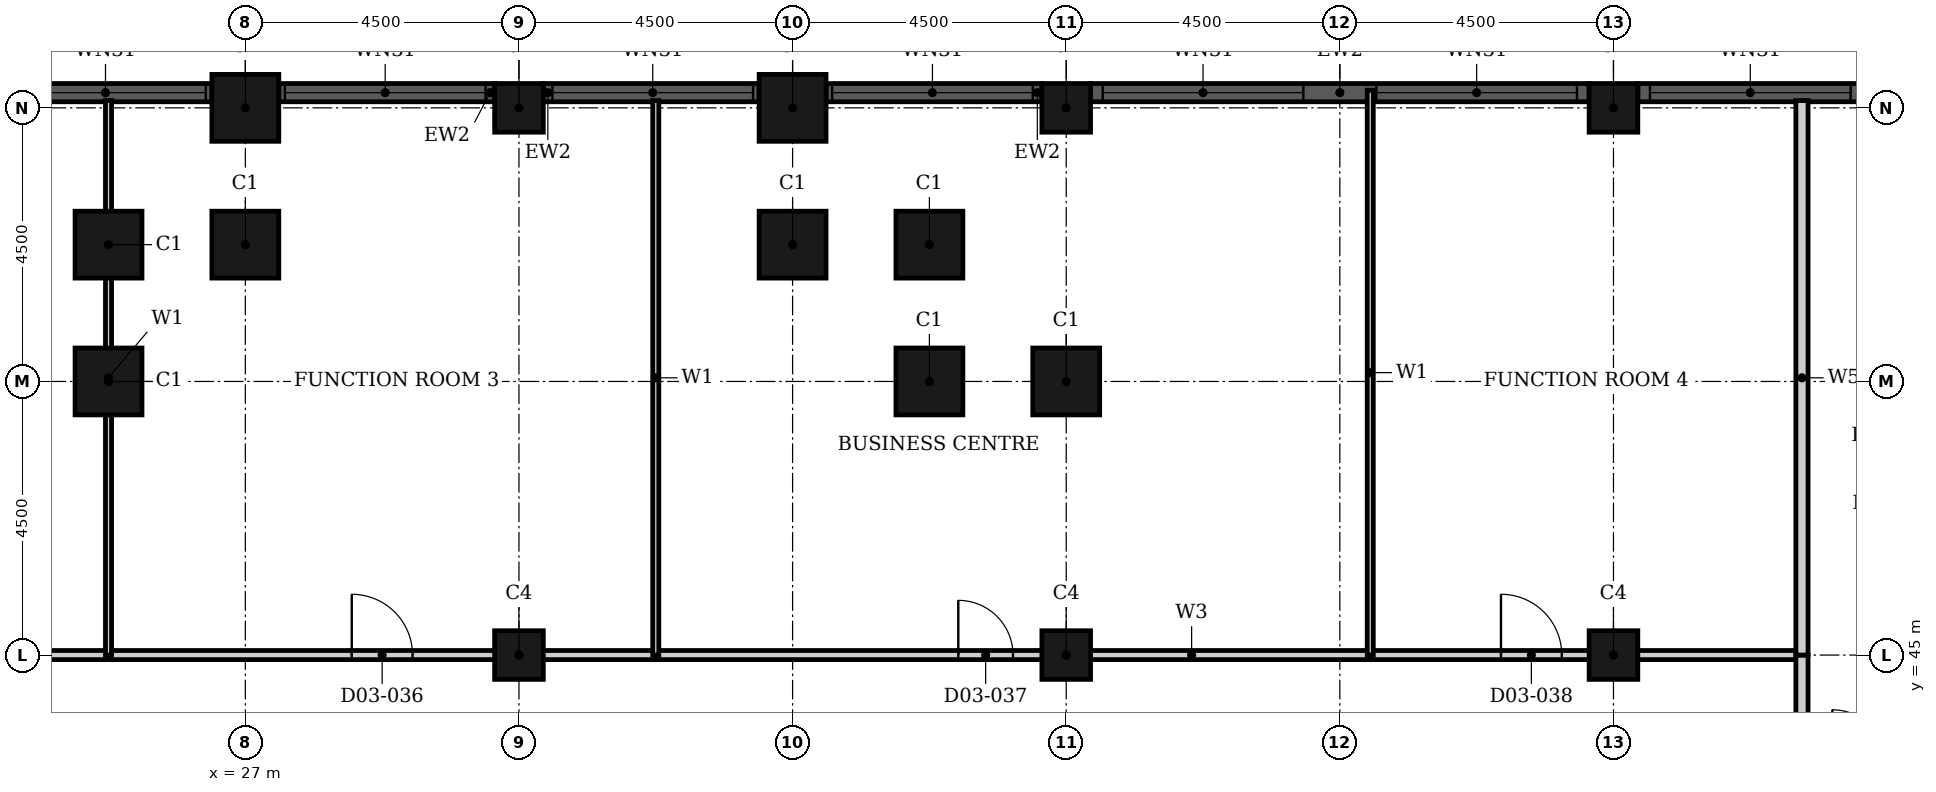
"""IFC4 building model, lengths in metres.
Left out: names, types, materials, properties, quantities, classifications, styles, units other than length and angle.
Written with IfcOpenShell. Run it as: python <this file> out.ifc"""

import sys

from ifc_helpers import new_model, si_unit, direction, frame, frame_2d, origin, origin_2d, place, context, subcontext, project, spatial, rectangle, hollow_rectangle, extrude, element, fill, save


model = new_model("IFC4")
c1 = context("Model", 3, precision=1e-05, world=origin(), true_north=direction((0.0, 1.0)))
c2 = subcontext(c1, "Body", "Model", "MODEL_VIEW")
j1 = project(units=[si_unit("LENGTHUNIT", "METRE"), si_unit("PLANEANGLEUNIT", "RADIAN")], contexts=[c1])
p1 = place(None, origin())
s1 = spatial("IfcSite", under=j1, at=p1, CompositionType="ELEMENT")
p2 = place(p1, origin())
s2 = spatial("IfcBuilding", under=s1, at=p2, CompositionType="ELEMENT")
p3 = place(p2, frame((0.0, 0.0, 17.4)))
s3 = spatial("IfcBuildingStorey", under=s2, at=p3, CompositionType="ELEMENT", Elevation=17.4)
for number, where, z_axis, x_axis in (
    (1, (40.5, 49.5, 0.0), (0.0, 0.0, 1.0), (1.0, 0.0, 0.0)),
    (2, (38.25, 49.5, 0.0), (0.0, 0.0, 1.0), (1.0, 0.0, 0.0)),
    (3, (38.25, 51.75, 0.0), (0.0, 0.0, 1.0), (1.0, 0.0, 0.0)),
    (4, (36.0, 51.75, 0.0), (0.0, 0.0, 1.0), (1.0, 0.0, 0.0)),
    (5, (36.0, 54.0, 0.0), (0.0, 0.0, 1.0), (1.0, 0.0, 0.0)),
    (6, (27.0, 54.0, 0.0), (0.0, 0.0, 1.0), (1.0, 0.0, 0.0)),
    (7, (27.0, 51.75, 0.0), (0.0, 0.0, 1.0), (1.0, 0.0, 0.0)),
    (8, (24.75, 51.75, 0.0), (0.0, 0.0, 1.0), (1.0, 0.0, 0.0)),
    (9, (24.75, 49.5, 0.0), (0.0, 0.0, 1.0), (1.0, 0.0, 0.0)),
):
    element("IfcColumn", number, at=place(p3, frame(where, z_axis=z_axis, x_axis=x_axis)), inside=s3, PredefinedType="COLUMN", context=c2, shape_type="SweptSolid", body=[
        extrude(hollow_rectangle(XDim=1.1, YDim=1.1, WallThickness=0.036, at=origin_2d()), origin(), (0.0, 0.0, 1.0), 6.6),
    ])
for number, where, z_axis, x_axis in (
    (10, (31.5, 54.0, 0.0), (0.0, 0.0, 1.0), (1.0, 0.0, 0.0)),
    (11, (40.5, 54.0, 0.0), (0.0, 0.0, 1.0), (1.0, 0.0, 0.0)),
    (12, (49.5, 54.0, 0.0), (0.0, 0.0, 1.0), (1.0, 0.0, 0.0)),
    (13, (31.5, 45.0, 0.0), (0.0, 0.0, 1.0), (1.0, 0.0, 0.0)),
    (14, (40.5, 45.0, 0.0), (0.0, 0.0, 1.0), (1.0, 0.0, 0.0)),
    (15, (49.5, 45.0, 0.0), (0.0, 0.0, 1.0), (1.0, 0.0, 0.0)),
):
    element("IfcColumn", number, at=place(p3, frame(where, z_axis=z_axis, x_axis=x_axis)), inside=s3, PredefinedType="COLUMN", context=c2, shape_type="SweptSolid", body=[
        extrude(hollow_rectangle(XDim=0.8, YDim=0.8, WallThickness=0.025, at=origin_2d()), origin(), (0.0, 0.0, 1.0), 6.6),
    ])
p4 = place(p3, frame((58.1, 54.25, 0.0), z_axis=(0.0, 0.0, 1.0), x_axis=(-1.0, 0.0, 0.0)))
e16 = element("IfcWall", 16, at=p4, inside=s3, PredefinedType="SOLIDWALL", context=c2, shape_type="SweptSolid", body=[
    extrude(rectangle(XDim=8.2, YDim=0.3, at=frame_2d((4.1, 0.0))), origin(), (0.0, 0.0, 1.0), 6.6),
])
p5 = place(p4, frame((0.2, 0.0, 0.9)))
e17 = element("IfcOpeningElement", 17, at=p5, cuts=e16, PredefinedType="OPENING", context=c2, shape_type="SweptSolid", body=[
    extrude(rectangle(XDim=3.3, YDim=3.6, at=frame_2d((1.65, 1.8))), frame((0.0, 0.16, 0.0), z_axis=(0.0, -1.0, 0.0), x_axis=(1.0, 0.0, 0.0)), (0.0, 0.0, 1.0), 0.32),
])
p6 = place(p4, frame((4.7, 0.0, 0.9)))
e18 = element("IfcOpeningElement", 18, at=p6, cuts=e16, PredefinedType="OPENING", context=c2, shape_type="SweptSolid", body=[
    extrude(rectangle(XDim=3.3, YDim=3.6, at=frame_2d((1.65, 1.8))), frame((0.0, 0.16, 0.0), z_axis=(0.0, -1.0, 0.0), x_axis=(1.0, 0.0, 0.0)), (0.0, 0.0, 1.0), 0.32),
])
p7 = place(p3, frame((49.1, 54.25, 0.0), z_axis=(0.0, 0.0, 1.0), x_axis=(-1.0, 0.0, 0.0)))
e19 = element("IfcWall", 19, at=p7, inside=s3, PredefinedType="SOLIDWALL", context=c2, shape_type="SweptSolid", body=[
    extrude(rectangle(XDim=8.2, YDim=0.3, at=frame_2d((4.1, 0.0))), origin(), (0.0, 0.0, 1.0), 6.6),
])
p8 = place(p7, frame((0.2, 0.0, 0.9)))
e20 = element("IfcOpeningElement", 20, at=p8, cuts=e19, PredefinedType="OPENING", context=c2, shape_type="SweptSolid", body=[
    extrude(rectangle(XDim=3.3, YDim=3.6, at=frame_2d((1.65, 1.8))), frame((0.0, 0.16, 0.0), z_axis=(0.0, -1.0, 0.0), x_axis=(1.0, 0.0, 0.0)), (0.0, 0.0, 1.0), 0.32),
])
p9 = place(p7, frame((4.7, 0.0, 0.9)))
e21 = element("IfcOpeningElement", 21, at=p9, cuts=e19, PredefinedType="OPENING", context=c2, shape_type="SweptSolid", body=[
    extrude(rectangle(XDim=3.3, YDim=3.6, at=frame_2d((1.65, 1.8))), frame((0.0, 0.16, 0.0), z_axis=(0.0, -1.0, 0.0), x_axis=(1.0, 0.0, 0.0)), (0.0, 0.0, 1.0), 0.32),
])
p10 = place(p3, frame((40.1, 54.25, 0.0), z_axis=(0.0, 0.0, 1.0), x_axis=(-1.0, 0.0, 0.0)))
e22 = element("IfcWall", 22, at=p10, inside=s3, PredefinedType="SOLIDWALL", context=c2, shape_type="SweptSolid", body=[
    extrude(rectangle(XDim=3.55, YDim=0.3, at=frame_2d((1.775, 0.0))), origin(), (0.0, 0.0, 1.0), 6.6),
])
p11 = place(p10, frame((0.15, 0.0, 0.9)))
e23 = element("IfcOpeningElement", 23, at=p11, cuts=e22, PredefinedType="OPENING", context=c2, shape_type="SweptSolid", body=[
    extrude(rectangle(XDim=3.3, YDim=3.6, at=frame_2d((1.65, 1.8))), frame((0.0, 0.16, 0.0), z_axis=(0.0, -1.0, 0.0), x_axis=(1.0, 0.0, 0.0)), (0.0, 0.0, 1.0), 0.32),
])
p12 = place(p3, frame((35.45, 54.25, 0.0), z_axis=(0.0, 0.0, 1.0), x_axis=(-1.0, 0.0, 0.0)))
e24 = element("IfcWall", 24, at=p12, inside=s3, PredefinedType="SOLIDWALL", context=c2, shape_type="SweptSolid", body=[
    extrude(rectangle(XDim=3.55, YDim=0.3, at=frame_2d((1.775, 0.0))), origin(), (0.0, 0.0, 1.0), 6.6),
])
p13 = place(p12, frame((0.1, 0.0, 0.9)))
e25 = element("IfcOpeningElement", 25, at=p13, cuts=e24, PredefinedType="OPENING", context=c2, shape_type="SweptSolid", body=[
    extrude(rectangle(XDim=3.3, YDim=3.6, at=frame_2d((1.65, 1.8))), frame((0.0, 0.16, 0.0), z_axis=(0.0, -1.0, 0.0), x_axis=(1.0, 0.0, 0.0)), (0.0, 0.0, 1.0), 0.32),
])
p14 = place(p3, frame((31.1, 54.25, 0.0), z_axis=(0.0, 0.0, 1.0), x_axis=(-1.0, 0.0, 0.0)))
e26 = element("IfcWall", 26, at=p14, inside=s3, PredefinedType="SOLIDWALL", context=c2, shape_type="SweptSolid", body=[
    extrude(rectangle(XDim=3.55, YDim=0.3, at=frame_2d((1.775, 0.0))), origin(), (0.0, 0.0, 1.0), 6.6),
])
p15 = place(p14, frame((0.15, 0.0, 0.9)))
e27 = element("IfcOpeningElement", 27, at=p15, cuts=e26, PredefinedType="OPENING", context=c2, shape_type="SweptSolid", body=[
    extrude(rectangle(XDim=3.3, YDim=3.6, at=frame_2d((1.65, 1.8))), frame((0.0, 0.16, 0.0), z_axis=(0.0, -1.0, 0.0), x_axis=(1.0, 0.0, 0.0)), (0.0, 0.0, 1.0), 0.32),
])
p16 = place(p3, frame((26.45, 54.25, 0.0), z_axis=(0.0, 0.0, 1.0), x_axis=(-1.0, 0.0, 0.0)))
e28 = element("IfcWall", 28, at=p16, inside=s3, PredefinedType="SOLIDWALL", context=c2, shape_type="SweptSolid", body=[
    extrude(rectangle(XDim=3.55, YDim=0.3, at=frame_2d((1.775, 0.0))), origin(), (0.0, 0.0, 1.0), 6.6),
])
p17 = place(p16, frame((0.1, 0.0, 0.9)))
e29 = element("IfcOpeningElement", 29, at=p17, cuts=e28, PredefinedType="OPENING", context=c2, shape_type="SweptSolid", body=[
    extrude(rectangle(XDim=3.3, YDim=3.6, at=frame_2d((1.65, 1.8))), frame((0.0, 0.16, 0.0), z_axis=(0.0, -1.0, 0.0), x_axis=(1.0, 0.0, 0.0)), (0.0, 0.0, 1.0), 0.32),
])
p18 = place(p3, frame((15.75, 45.0, 0.0), z_axis=(0.0, 0.0, 1.0), x_axis=(1.0, 0.0, 0.0)))
e30 = element("IfcWall", 30, at=p18, inside=s3, PredefinedType="PARTITIONING", context=c2, shape_type="SweptSolid", body=[
    extrude(rectangle(XDim=9.0, YDim=0.15, at=frame_2d((4.5, 0.0))), origin(), (0.0, 0.0, 1.0), 6.25),
])
p19 = place(p18, frame((4.0, 0.0, 0.0)))
e31 = element("IfcOpeningElement", 31, at=p19, cuts=e30, PredefinedType="OPENING", context=c2, shape_type="SweptSolid", body=[
    extrude(rectangle(XDim=1.0, YDim=2.1, at=frame_2d((0.5, 1.05))), frame((0.0, 0.085, 0.0), z_axis=(0.0, -1.0, 0.0), x_axis=(1.0, 0.0, 0.0)), (0.0, 0.0, 1.0), 0.17),
])
p20 = place(p3, frame((24.75, 45.0, 0.0), z_axis=(0.0, 0.0, 1.0), x_axis=(1.0, 0.0, 0.0)))
e32 = element("IfcWall", 32, at=p20, inside=s3, PredefinedType="PARTITIONING", context=c2, shape_type="SweptSolid", body=[
    extrude(rectangle(XDim=9.0, YDim=0.15, at=frame_2d((4.5, 0.0))), origin(), (0.0, 0.0, 1.0), 6.25),
])
p21 = place(p20, frame((4.0, 0.0, 0.0)))
e33 = element("IfcOpeningElement", 33, at=p21, cuts=e32, PredefinedType="OPENING", context=c2, shape_type="SweptSolid", body=[
    extrude(rectangle(XDim=1.0, YDim=2.1, at=frame_2d((0.5, 1.05))), frame((0.0, 0.085, 0.0), z_axis=(0.0, -1.0, 0.0), x_axis=(1.0, 0.0, 0.0)), (0.0, 0.0, 1.0), 0.17),
])
p22 = place(p3, frame((33.75, 45.0, 0.0), z_axis=(0.0, 0.0, 1.0), x_axis=(1.0, 0.0, 0.0)))
e34 = element("IfcWall", 34, at=p22, inside=s3, PredefinedType="PARTITIONING", context=c2, shape_type="SweptSolid", body=[
    extrude(rectangle(XDim=11.75, YDim=0.15, at=frame_2d((5.875, 0.0))), origin(), (0.0, 0.0, 1.0), 6.25),
])
p23 = place(p22, frame((4.975, 0.0, 0.0)))
e35 = element("IfcOpeningElement", 35, at=p23, cuts=e34, PredefinedType="OPENING", context=c2, shape_type="SweptSolid", body=[
    extrude(rectangle(XDim=0.9, YDim=2.1, at=frame_2d((0.45, 1.05))), frame((0.0, 0.085, 0.0), z_axis=(0.0, -1.0, 0.0), x_axis=(1.0, 0.0, 0.0)), (0.0, 0.0, 1.0), 0.17),
])
p24 = place(p3, frame((45.5, 45.0, 0.0), z_axis=(0.0, 0.0, 1.0), x_axis=(1.0, 0.0, 0.0)))
e36 = element("IfcWall", 36, at=p24, inside=s3, PredefinedType="PARTITIONING", context=c2, shape_type="SweptSolid", body=[
    extrude(rectangle(XDim=7.1, YDim=0.15, at=frame_2d((3.55, 0.0))), origin(), (0.0, 0.0, 1.0), 6.25),
])
p25 = place(p24, frame((2.15, 0.0, 0.0)))
e37 = element("IfcOpeningElement", 37, at=p25, cuts=e36, PredefinedType="OPENING", context=c2, shape_type="SweptSolid", body=[
    extrude(rectangle(XDim=1.0, YDim=2.1, at=frame_2d((0.5, 1.05))), frame((0.0, 0.085, 0.0), z_axis=(0.0, -1.0, 0.0), x_axis=(1.0, 0.0, 0.0)), (0.0, 0.0, 1.0), 0.17),
])
for number, where, z_axis, x_axis in (
    (38, (24.75, 45.0, 0.0), (0.0, 0.0, 1.0), (0.0, 1.0, 0.0)),
    (39, (33.75, 45.0, 0.0), (0.0, 0.0, 1.0), (0.0, 1.0, 0.0)),
):
    element("IfcWall", number, at=place(p3, frame(where, z_axis=z_axis, x_axis=x_axis)), inside=s3, PredefinedType="PARTITIONING", context=c2, shape_type="SweptSolid", body=[
        extrude(rectangle(XDim=9.12, YDim=0.1, at=frame_2d((4.56, 0.0))), origin(), (0.0, 0.0, 1.0), 6.25),
    ])
p26 = place(p3, frame((45.5, 45.0, 0.0), z_axis=(0.0, 0.0, 1.0), x_axis=(0.0, 1.0, 0.0)))
e40 = element("IfcWall", 40, at=p26, inside=s3, PredefinedType="PARTITIONING", context=c2, shape_type="SweptSolid", body=[
    extrude(rectangle(XDim=9.29, YDim=0.1, at=frame_2d((4.645, 0.0))), origin(), (0.0, 0.0, 1.0), 6.25),
])
p27 = place(p3, frame((52.6, 43.2, 0.0), z_axis=(0.0, 0.0, 1.0), x_axis=(0.0, 1.0, 0.0)))
e41 = element("IfcWall", 41, at=p27, inside=s3, PredefinedType="PARTITIONING", context=c2, shape_type="SweptSolid", body=[
    extrude(rectangle(XDim=1.8, YDim=0.2, at=frame_2d((0.9, 0.0))), origin(), (0.0, 0.0, 1.0), 6.25),
])
p28 = place(p3, frame((52.6, 45.0, 0.0), z_axis=(0.0, 0.0, 1.0), x_axis=(0.0, 1.0, 0.0)))
e42 = element("IfcWall", 42, at=p28, inside=s3, PredefinedType="PARTITIONING", context=c2, shape_type="SweptSolid", body=[
    extrude(rectangle(XDim=9.12, YDim=0.2, at=frame_2d((4.56, 0.0))), origin(), (0.0, 0.0, 1.0), 6.25),
])
p29 = place(p6, origin())
e43 = element("IfcWindow", 43, at=p29, inside=s3, PartitioningType="SINGLE_PANEL", PredefinedType="WINDOW", context=c2, shape_type="SweptSolid", body=[
    extrude(rectangle(XDim=3.3, YDim=3.6, at=frame_2d((1.65, 1.8))), frame((0.0, 0.03, 0.0), z_axis=(0.0, -1.0, 0.0), x_axis=(1.0, 0.0, 0.0)), (0.0, 0.0, 1.0), 0.06),
])
fill(e18, e43)
p30 = place(p8, origin())
e44 = element("IfcWindow", 44, at=p30, inside=s3, PartitioningType="SINGLE_PANEL", PredefinedType="WINDOW", context=c2, shape_type="SweptSolid", body=[
    extrude(rectangle(XDim=3.3, YDim=3.6, at=frame_2d((1.65, 1.8))), frame((0.0, 0.03, 0.0), z_axis=(0.0, -1.0, 0.0), x_axis=(1.0, 0.0, 0.0)), (0.0, 0.0, 1.0), 0.06),
])
fill(e20, e44)
p31 = place(p9, origin())
e45 = element("IfcWindow", 45, at=p31, inside=s3, PartitioningType="SINGLE_PANEL", PredefinedType="WINDOW", context=c2, shape_type="SweptSolid", body=[
    extrude(rectangle(XDim=3.3, YDim=3.6, at=frame_2d((1.65, 1.8))), frame((0.0, 0.03, 0.0), z_axis=(0.0, -1.0, 0.0), x_axis=(1.0, 0.0, 0.0)), (0.0, 0.0, 1.0), 0.06),
])
fill(e21, e45)
p32 = place(p11, origin())
e46 = element("IfcWindow", 46, at=p32, inside=s3, PartitioningType="SINGLE_PANEL", PredefinedType="WINDOW", context=c2, shape_type="SweptSolid", body=[
    extrude(rectangle(XDim=3.3, YDim=3.6, at=frame_2d((1.65, 1.8))), frame((0.0, 0.03, 0.0), z_axis=(0.0, -1.0, 0.0), x_axis=(1.0, 0.0, 0.0)), (0.0, 0.0, 1.0), 0.06),
])
fill(e23, e46)
p33 = place(p13, origin())
e47 = element("IfcWindow", 47, at=p33, inside=s3, PartitioningType="SINGLE_PANEL", PredefinedType="WINDOW", context=c2, shape_type="SweptSolid", body=[
    extrude(rectangle(XDim=3.3, YDim=3.6, at=frame_2d((1.65, 1.8))), frame((0.0, 0.03, 0.0), z_axis=(0.0, -1.0, 0.0), x_axis=(1.0, 0.0, 0.0)), (0.0, 0.0, 1.0), 0.06),
])
fill(e25, e47)
p34 = place(p15, origin())
e48 = element("IfcWindow", 48, at=p34, inside=s3, PartitioningType="SINGLE_PANEL", PredefinedType="WINDOW", context=c2, shape_type="SweptSolid", body=[
    extrude(rectangle(XDim=3.3, YDim=3.6, at=frame_2d((1.65, 1.8))), frame((0.0, 0.03, 0.0), z_axis=(0.0, -1.0, 0.0), x_axis=(1.0, 0.0, 0.0)), (0.0, 0.0, 1.0), 0.06),
])
fill(e27, e48)
p35 = place(p17, origin())
e49 = element("IfcWindow", 49, at=p35, inside=s3, PartitioningType="SINGLE_PANEL", PredefinedType="WINDOW", context=c2, shape_type="SweptSolid", body=[
    extrude(rectangle(XDim=3.3, YDim=3.6, at=frame_2d((1.65, 1.8))), frame((0.0, 0.03, 0.0), z_axis=(0.0, -1.0, 0.0), x_axis=(1.0, 0.0, 0.0)), (0.0, 0.0, 1.0), 0.06),
])
fill(e29, e49)
p36 = place(p21, origin())
e50 = element("IfcDoor", 50, at=p36, inside=s3, OperationType="SINGLE_SWING_RIGHT", PredefinedType="DOOR", context=c2, shape_type="SweptSolid", body=[
    extrude(rectangle(XDim=1.0, YDim=2.1, at=frame_2d((0.5, 1.05))), frame((0.0, 0.025, 0.0), z_axis=(0.0, -1.0, 0.0), x_axis=(1.0, 0.0, 0.0)), (0.0, 0.0, 1.0), 0.05),
])
fill(e33, e50)
p37 = place(p23, origin())
e51 = element("IfcDoor", 51, at=p37, inside=s3, OperationType="SINGLE_SWING_LEFT", PredefinedType="DOOR", context=c2, shape_type="SweptSolid", body=[
    extrude(rectangle(XDim=0.9, YDim=2.1, at=frame_2d((0.45, 1.05))), frame((0.0, 0.025, 0.0), z_axis=(0.0, -1.0, 0.0), x_axis=(1.0, 0.0, 0.0)), (0.0, 0.0, 1.0), 0.05),
])
fill(e35, e51)
p38 = place(p25, origin())
e52 = element("IfcDoor", 52, at=p38, inside=s3, OperationType="SINGLE_SWING_LEFT", PredefinedType="DOOR", context=c2, shape_type="SweptSolid", body=[
    extrude(rectangle(XDim=1.0, YDim=2.1, at=frame_2d((0.5, 1.05))), frame((0.0, 0.025, 0.0), z_axis=(0.0, -1.0, 0.0), x_axis=(1.0, 0.0, 0.0)), (0.0, 0.0, 1.0), 0.05),
])
fill(e37, e52)
save(model, sys.argv[1])
